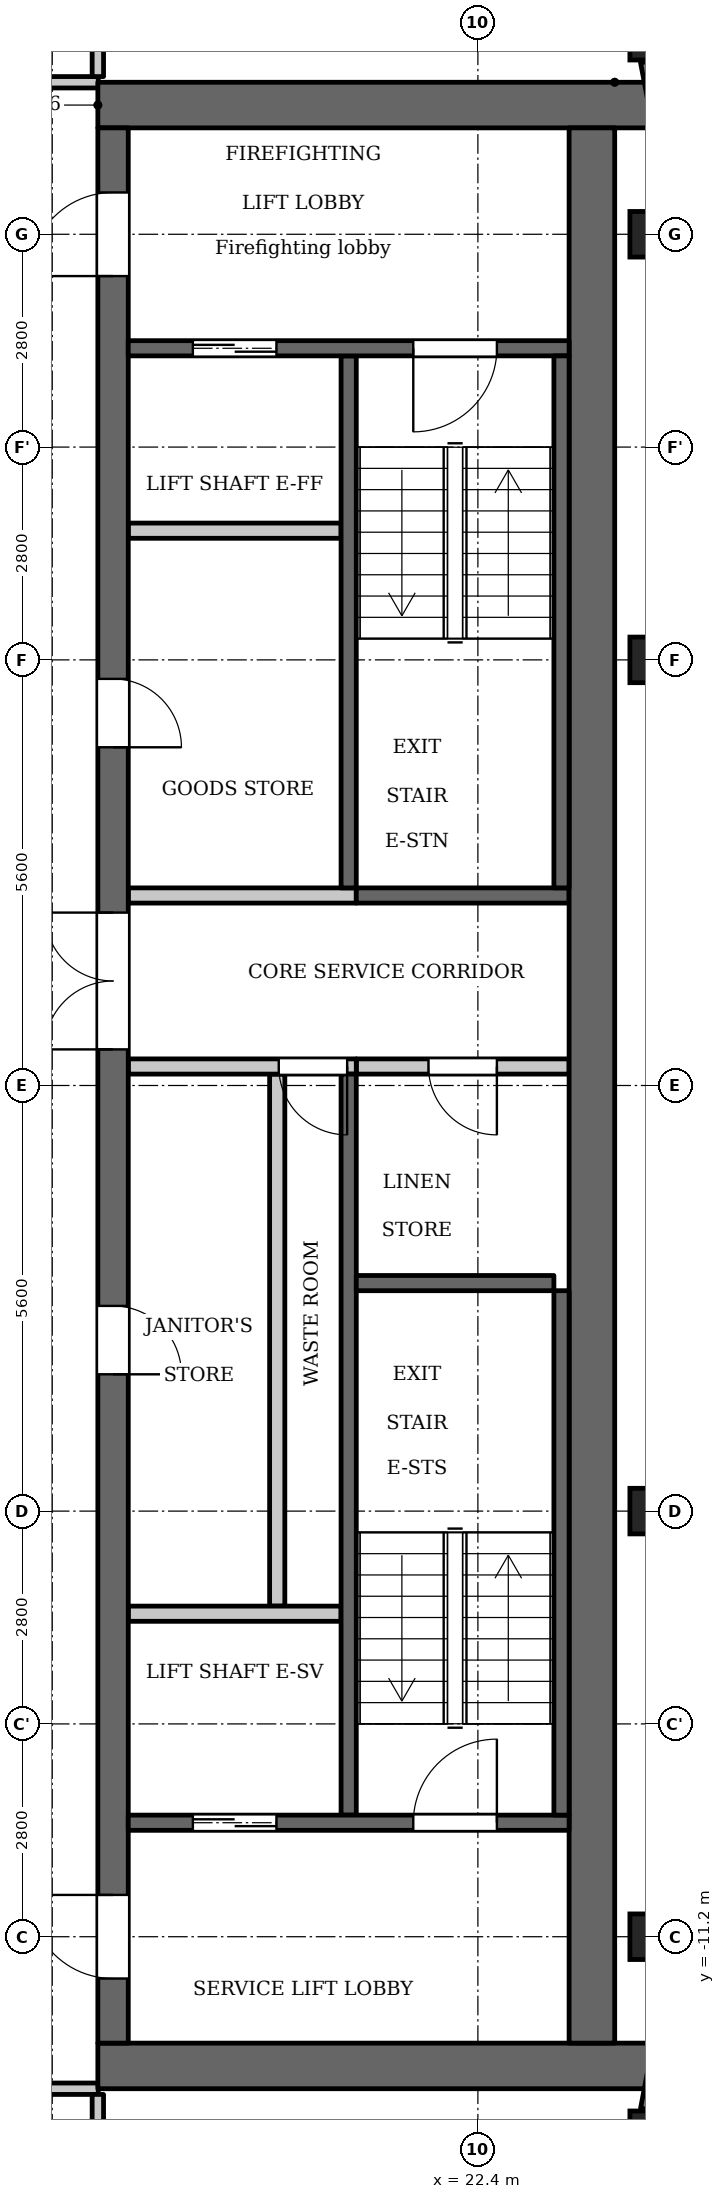
"""IFC4 building model, lengths in metres.
Left out: names, types, materials, properties, quantities, classifications, styles, units other than length and angle.
Written with IfcOpenShell. Run it as: python <this file> out.ifc"""

import sys

from ifc_helpers import new_model, si_unit, direction, frame, frame_2d, origin, origin_2d, place, context, subcontext, project, spatial, rectangle, extrude, element, fill, save


model = new_model("IFC4")
c1 = context("Model", 3, precision=1e-05, world=origin(), true_north=direction((0.0, 1.0)))
c2 = subcontext(c1, "Body", "Model", "MODEL_VIEW")
j1 = project(units=[si_unit("LENGTHUNIT", "METRE"), si_unit("PLANEANGLEUNIT", "RADIAN")], contexts=[c1])
p1 = place(None, origin())
s1 = spatial("IfcSite", under=j1, at=p1, CompositionType="ELEMENT")
p2 = place(p1, origin())
s2 = spatial("IfcBuilding", under=s1, at=p2, CompositionType="ELEMENT")
p3 = place(p2, frame((0.0, 0.0, 303.4)))
s3 = spatial("IfcBuildingStorey", under=s2, at=p3, CompositionType="ELEMENT", Elevation=303.4)
for number, where, z_axis, x_axis in (
    (1, (24.7, -13.793, 0.0), (0.0, 0.0, 1.0), (1.0, 0.0, 0.0)),
    (2, (24.7, -11.2, 0.0), (0.0, 0.0, 1.0), (1.0, 0.0, 0.0)),
    (3, (24.7, -5.6, 0.0), (0.0, 0.0, 1.0), (1.0, 0.0, 0.0)),
    (4, (24.7, 5.6, 0.0), (0.0, 0.0, 1.0), (1.0, 0.0, 0.0)),
    (5, (24.7, 11.2, 0.0), (0.0, 0.0, 1.0), (1.0, 0.0, 0.0)),
    (6, (24.7, 13.793, 0.0), (0.0, 0.0, 1.0), (1.0, 0.0, 0.0)),
):
    element("IfcColumn", number, at=place(p3, frame(where, z_axis=z_axis, x_axis=x_axis)), inside=s3, PredefinedType="COLUMN", context=c2, shape_type="SweptSolid", body=[
        extrude(rectangle(XDim=0.6, YDim=0.6, at=origin_2d()), origin(), (0.0, 0.0, 1.0), 3.5),
    ])
for number, where, z_axis, x_axis in (
    (7, (24.688, -13.485, 0.0), (0.0, 0.0, 1.0), (0.187, 0.982, 0.0)),
    (8, (25.052, 11.573, 0.0), (0.0, 0.0, 1.0), (-0.187, 0.982, 0.0)),
):
    element("IfcWall", number, at=place(p3, frame(where, z_axis=z_axis, x_axis=x_axis)), inside=s3, PredefinedType="SOLIDWALL", context=c2, shape_type="SweptSolid", body=[
        extrude(rectangle(XDim=1.947, YDim=0.3, at=frame_2d((0.973, 0.0))), origin(), (0.0, 0.0, 1.0), 2.6),
    ])
p4 = place(p3, frame((20.7, 2.6, 0.0), z_axis=(0.0, 0.0, 1.0), x_axis=(0.0, 1.0, 0.0)))
e9 = element("IfcWall", 9, at=p4, inside=s3, PredefinedType="SHEAR", context=c2, shape_type="SweptSolid", body=[
    extrude(rectangle(XDim=7.0, YDim=0.2, at=frame_2d((3.5, 0.0))), origin(), (0.0, 0.0, 1.0), 3.2),
])
p5 = place(p3, frame((20.7, -9.6, 0.0), z_axis=(0.0, 0.0, 1.0), x_axis=(0.0, 1.0, 0.0)))
e10 = element("IfcWall", 10, at=p5, inside=s3, PredefinedType="SHEAR", context=c2, shape_type="SweptSolid", body=[
    extrude(rectangle(XDim=9.75, YDim=0.2, at=frame_2d((4.875, 0.0))), origin(), (0.0, 0.0, 1.0), 3.2),
])
p6 = place(p3, frame((20.8, 2.5, 0.0), z_axis=(0.0, 0.0, 1.0), x_axis=(1.0, 0.0, 0.0)))
e11 = element("IfcWall", 11, at=p6, inside=s3, PredefinedType="SHEAR", context=c2, shape_type="SweptSolid", body=[
    extrude(rectangle(XDim=2.8, YDim=0.2, at=frame_2d((1.4, 0.0))), origin(), (0.0, 0.0, 1.0), 3.2),
])
p7 = place(p3, frame((20.8, 0.25, 0.0), z_axis=(0.0, 0.0, 1.0), x_axis=(1.0, 0.0, 0.0)))
e12 = element("IfcWall", 12, at=p7, inside=s3, PredefinedType="PARTITIONING", context=c2, shape_type="SweptSolid", body=[
    extrude(rectangle(XDim=2.8, YDim=0.2, at=frame_2d((1.4, 0.0))), origin(), (0.0, 0.0, 1.0), 3.2),
])
p8 = place(p7, frame((0.95, 0.0, 0.0)))
e13 = element("IfcOpeningElement", 13, at=p8, cuts=e12, PredefinedType="OPENING", context=c2, shape_type="SweptSolid", body=[
    extrude(rectangle(XDim=0.9, YDim=2.1, at=frame_2d((0.45, 1.05))), frame((0.0, 0.11, 0.0), z_axis=(0.0, -1.0, 0.0), x_axis=(1.0, 0.0, 0.0)), (0.0, 0.0, 1.0), 0.22),
])
for number, where, z_axis, x_axis in (
    (14, (17.4, 12.9, 0.0), (0.0, 0.0, 1.0), (1.0, 0.0, 0.0)),
    (15, (17.4, -12.9, 0.0), (0.0, 0.0, 1.0), (1.0, 0.0, 0.0)),
):
    element("IfcWall", number, at=place(p3, frame(where, z_axis=z_axis, x_axis=x_axis)), inside=s3, PredefinedType="SHEAR", context=c2, shape_type="SweptSolid", body=[
        extrude(rectangle(XDim=7.6, YDim=0.6, at=frame_2d((3.8, 0.0))), origin(), (0.0, 0.0, 1.0), 3.2),
    ])
p9 = place(p3, frame((19.76, -6.85, 0.0), z_axis=(0.0, 0.0, 1.0), x_axis=(0.0, 1.0, 0.0)))
e16 = element("IfcWall", 16, at=p9, inside=s3, PredefinedType="PARTITIONING", context=c2, shape_type="SweptSolid", body=[
    extrude(rectangle(XDim=7.0, YDim=0.2, at=frame_2d((3.5, 0.0))), origin(), (0.0, 0.0, 1.0), 3.2),
])
p10 = place(p3, frame((17.6, -12.6, 0.0), z_axis=(0.0, 0.0, 1.0), x_axis=(0.0, 1.0, 0.0)))
e17 = element("IfcWall", 17, at=p10, inside=s3, PredefinedType="SHEAR", context=c2, shape_type="SweptSolid", body=[
    extrude(rectangle(XDim=25.2, YDim=0.4, at=frame_2d((12.6, 0.0))), origin(), (0.0, 0.0, 1.0), 3.2),
])
p11 = place(p10, frame((8.8, 0.0, 0.0)))
e18 = element("IfcOpeningElement", 18, at=p11, cuts=e17, PredefinedType="OPENING", context=c2, shape_type="SweptSolid", body=[
    extrude(rectangle(XDim=0.9, YDim=2.1, at=frame_2d((0.45, 1.05))), frame((0.0, 0.21, 0.0), z_axis=(0.0, -1.0, 0.0), x_axis=(1.0, 0.0, 0.0)), (0.0, 0.0, 1.0), 0.42),
])
p12 = place(p10, frame((17.05, 0.0, 0.0)))
e19 = element("IfcOpeningElement", 19, at=p12, cuts=e17, PredefinedType="OPENING", context=c2, shape_type="SweptSolid", body=[
    extrude(rectangle(XDim=0.9, YDim=2.1, at=frame_2d((0.45, 1.05))), frame((0.0, 0.21, 0.0), z_axis=(0.0, -1.0, 0.0), x_axis=(1.0, 0.0, 0.0)), (0.0, 0.0, 1.0), 0.42),
])
p13 = place(p10, frame((23.25, 0.0, 0.0)))
e20 = element("IfcOpeningElement", 20, at=p13, cuts=e17, PredefinedType="OPENING", context=c2, shape_type="SweptSolid", body=[
    extrude(rectangle(XDim=1.1, YDim=2.1, at=frame_2d((0.55, 1.05))), frame((0.0, 0.21, 0.0), z_axis=(0.0, -1.0, 0.0), x_axis=(1.0, 0.0, 0.0)), (0.0, 0.0, 1.0), 0.42),
])
p14 = place(p10, frame((0.85, 0.0, 0.0)))
e21 = element("IfcOpeningElement", 21, at=p14, cuts=e17, PredefinedType="OPENING", context=c2, shape_type="SweptSolid", body=[
    extrude(rectangle(XDim=1.1, YDim=2.1, at=frame_2d((0.55, 1.05))), frame((0.0, 0.21, 0.0), z_axis=(0.0, -1.0, 0.0), x_axis=(1.0, 0.0, 0.0)), (0.0, 0.0, 1.0), 0.42),
])
p15 = place(p10, frame((13.075, 0.0, 0.0)))
e22 = element("IfcOpeningElement", 22, at=p15, cuts=e17, PredefinedType="OPENING", context=c2, shape_type="SweptSolid", body=[
    extrude(rectangle(XDim=1.8, YDim=2.1, at=frame_2d((0.9, 1.05))), frame((0.0, 0.21, 0.0), z_axis=(0.0, -1.0, 0.0), x_axis=(1.0, 0.0, 0.0)), (0.0, 0.0, 1.0), 0.42),
])
p16 = place(p3, frame((23.9, -12.6, 0.0), z_axis=(0.0, 0.0, 1.0), x_axis=(0.0, 1.0, 0.0)))
e23 = element("IfcWall", 23, at=p16, inside=s3, PredefinedType="SHEAR", context=c2, shape_type="SweptSolid", body=[
    extrude(rectangle(XDim=25.2, YDim=0.6, at=frame_2d((12.6, 0.0))), origin(), (0.0, 0.0, 1.0), 3.2),
])
p17 = place(p3, frame((17.8, -9.7, 0.0), z_axis=(0.0, 0.0, 1.0), x_axis=(1.0, 0.0, 0.0)))
e24 = element("IfcWall", 24, at=p17, inside=s3, PredefinedType="SHEAR", context=c2, shape_type="SweptSolid", body=[
    extrude(rectangle(XDim=5.8, YDim=0.2, at=frame_2d((2.9, 0.0))), origin(), (0.0, 0.0, 1.0), 3.2),
])
p18 = place(p17, frame((0.85, 0.0, 0.0)))
e25 = element("IfcOpeningElement", 25, at=p18, cuts=e24, PredefinedType="OPENING", context=c2, shape_type="SweptSolid", body=[
    extrude(rectangle(XDim=1.1, YDim=2.1, at=frame_2d((0.55, 1.05))), frame((0.0, 0.11, 0.0), z_axis=(0.0, -1.0, 0.0), x_axis=(1.0, 0.0, 0.0)), (0.0, 0.0, 1.0), 0.22),
])
p19 = place(p17, frame((3.75, 0.0, 0.0)))
e26 = element("IfcOpeningElement", 26, at=p19, cuts=e24, PredefinedType="OPENING", context=c2, shape_type="SweptSolid", body=[
    extrude(rectangle(XDim=1.1, YDim=2.1, at=frame_2d((0.55, 1.05))), frame((0.0, 0.11, 0.0), z_axis=(0.0, -1.0, 0.0), x_axis=(1.0, 0.0, 0.0)), (0.0, 0.0, 1.0), 0.22),
])
p20 = place(p3, frame((17.8, -6.95, 0.0), z_axis=(0.0, 0.0, 1.0), x_axis=(1.0, 0.0, 0.0)))
e27 = element("IfcWall", 27, at=p20, inside=s3, PredefinedType="PARTITIONING", context=c2, shape_type="SweptSolid", body=[
    extrude(rectangle(XDim=2.8, YDim=0.2, at=frame_2d((1.4, 0.0))), origin(), (0.0, 0.0, 1.0), 3.2),
])
p21 = place(p3, frame((17.8, 0.25, 0.0), z_axis=(0.0, 0.0, 1.0), x_axis=(1.0, 0.0, 0.0)))
e28 = element("IfcWall", 28, at=p21, inside=s3, PredefinedType="PARTITIONING", context=c2, shape_type="SweptSolid", body=[
    extrude(rectangle(XDim=3.0, YDim=0.2, at=frame_2d((1.5, 0.0))), origin(), (0.0, 0.0, 1.0), 3.2),
])
p22 = place(p21, frame((1.98, 0.0, 0.0)))
e29 = element("IfcOpeningElement", 29, at=p22, cuts=e28, PredefinedType="OPENING", context=c2, shape_type="SweptSolid", body=[
    extrude(rectangle(XDim=0.9, YDim=2.1, at=frame_2d((0.45, 1.05))), frame((0.0, 0.11, 0.0), z_axis=(0.0, -1.0, 0.0), x_axis=(1.0, 0.0, 0.0)), (0.0, 0.0, 1.0), 0.22),
])
p23 = place(p3, frame((17.8, 2.5, 0.0), z_axis=(0.0, 0.0, 1.0), x_axis=(1.0, 0.0, 0.0)))
e30 = element("IfcWall", 30, at=p23, inside=s3, PredefinedType="PARTITIONING", context=c2, shape_type="SweptSolid", body=[
    extrude(rectangle(XDim=3.0, YDim=0.2, at=frame_2d((1.5, 0.0))), origin(), (0.0, 0.0, 1.0), 3.2),
])
p24 = place(p3, frame((17.8, 7.3, 0.0), z_axis=(0.0, 0.0, 1.0), x_axis=(1.0, 0.0, 0.0)))
e31 = element("IfcWall", 31, at=p24, inside=s3, PredefinedType="PARTITIONING", context=c2, shape_type="SweptSolid", body=[
    extrude(rectangle(XDim=2.8, YDim=0.2, at=frame_2d((1.4, 0.0))), origin(), (0.0, 0.0, 1.0), 3.2),
])
p25 = place(p3, frame((17.8, 9.7, 0.0), z_axis=(0.0, 0.0, 1.0), x_axis=(1.0, 0.0, 0.0)))
e32 = element("IfcWall", 32, at=p25, inside=s3, PredefinedType="SHEAR", context=c2, shape_type="SweptSolid", body=[
    extrude(rectangle(XDim=5.8, YDim=0.2, at=frame_2d((2.9, 0.0))), origin(), (0.0, 0.0, 1.0), 3.2),
])
p26 = place(p25, frame((0.85, 0.0, 0.0)))
e33 = element("IfcOpeningElement", 33, at=p26, cuts=e32, PredefinedType="OPENING", context=c2, shape_type="SweptSolid", body=[
    extrude(rectangle(XDim=1.1, YDim=2.1, at=frame_2d((0.55, 1.05))), frame((0.0, 0.11, 0.0), z_axis=(0.0, -1.0, 0.0), x_axis=(1.0, 0.0, 0.0)), (0.0, 0.0, 1.0), 0.22),
])
p27 = place(p25, frame((3.75, 0.0, 0.0)))
e34 = element("IfcOpeningElement", 34, at=p27, cuts=e32, PredefinedType="OPENING", context=c2, shape_type="SweptSolid", body=[
    extrude(rectangle(XDim=1.1, YDim=2.1, at=frame_2d((0.55, 1.05))), frame((0.0, 0.11, 0.0), z_axis=(0.0, -1.0, 0.0), x_axis=(1.0, 0.0, 0.0)), (0.0, 0.0, 1.0), 0.22),
])
p28 = place(p3, frame((23.5, 2.6, 0.0), z_axis=(0.0, 0.0, 1.0), x_axis=(0.0, 1.0, 0.0)))
e35 = element("IfcWall", 35, at=p28, inside=s3, PredefinedType="SHEAR", context=c2, shape_type="SweptSolid", body=[
    extrude(rectangle(XDim=7.0, YDim=0.2, at=frame_2d((3.5, 0.0))), origin(), (0.0, 0.0, 1.0), 3.2),
])
p29 = place(p3, frame((23.5, -9.6, 0.0), z_axis=(0.0, 0.0, 1.0), x_axis=(0.0, 1.0, 0.0)))
e36 = element("IfcWall", 36, at=p29, inside=s3, PredefinedType="SHEAR", context=c2, shape_type="SweptSolid", body=[
    extrude(rectangle(XDim=6.9, YDim=0.2, at=frame_2d((3.45, 0.0))), origin(), (0.0, 0.0, 1.0), 3.2),
])
p30 = place(p3, frame((20.8, -2.6, 0.0), z_axis=(0.0, 0.0, 1.0), x_axis=(1.0, 0.0, 0.0)))
e37 = element("IfcWall", 37, at=p30, inside=s3, PredefinedType="SHEAR", context=c2, shape_type="SweptSolid", body=[
    extrude(rectangle(XDim=2.6, YDim=0.2, at=frame_2d((1.3, 0.0))), origin(), (0.0, 0.0, 1.0), 3.2),
])
p31 = place(p3, frame((15.32, -13.2, 0.0), z_axis=(0.0, 0.0, 1.0), x_axis=(1.0, 0.0, 0.0)))
e38 = element("IfcWall", 38, at=p31, inside=s3, PredefinedType="PARTITIONING", context=c2, shape_type="SweptSolid", body=[
    extrude(rectangle(XDim=2.085, YDim=0.15, at=frame_2d((1.042, 0.0))), origin(), (0.0, 0.0, 1.0), 3.2),
])
p32 = place(p31, frame((0.42, 0.0, 0.0)))
e39 = element("IfcOpeningElement", 39, at=p32, cuts=e38, PredefinedType="OPENING", context=c2, shape_type="SweptSolid", body=[
    extrude(rectangle(XDim=1.0, YDim=2.1, at=frame_2d((0.5, 1.05))), frame((0.0, 0.085, 0.0), z_axis=(0.0, -1.0, 0.0), x_axis=(1.0, 0.0, 0.0)), (0.0, 0.0, 1.0), 0.17),
])
p33 = place(p3, frame((15.32, 13.2, 0.0), z_axis=(0.0, 0.0, 1.0), x_axis=(1.0, 0.0, 0.0)))
e40 = element("IfcWall", 40, at=p33, inside=s3, PredefinedType="PARTITIONING", context=c2, shape_type="SweptSolid", body=[
    extrude(rectangle(XDim=2.085, YDim=0.15, at=frame_2d((1.042, 0.0))), origin(), (0.0, 0.0, 1.0), 3.2),
])
p34 = place(p33, frame((0.43, 0.0, 0.0)))
e41 = element("IfcOpeningElement", 41, at=p34, cuts=e40, PredefinedType="OPENING", context=c2, shape_type="SweptSolid", body=[
    extrude(rectangle(XDim=1.0, YDim=2.1, at=frame_2d((0.5, 1.05))), frame((0.0, 0.085, 0.0), z_axis=(0.0, -1.0, 0.0), x_axis=(1.0, 0.0, 0.0)), (0.0, 0.0, 1.0), 0.17),
])
p35 = place(p3, frame((17.4, -19.236, 0.0), z_axis=(0.0, 0.0, 1.0), x_axis=(0.0, 1.0, 0.0)))
e42 = element("IfcWall", 42, at=p35, inside=s3, PredefinedType="PARTITIONING", context=c2, shape_type="SweptSolid", body=[
    extrude(rectangle(XDim=5.961, YDim=0.15, at=frame_2d((2.981, 0.0))), origin(), (0.0, 0.0, 1.0), 3.2),
])
p36 = place(p35, frame((3.917, 0.0, 0.0)))
e43 = element("IfcOpeningElement", 43, at=p36, cuts=e42, PredefinedType="OPENING", context=c2, shape_type="SweptSolid", body=[
    extrude(rectangle(XDim=0.9, YDim=2.1, at=frame_2d((0.45, 1.05))), frame((0.0, 0.085, 0.0), z_axis=(0.0, -1.0, 0.0), x_axis=(1.0, 0.0, 0.0)), (0.0, 0.0, 1.0), 0.17),
])
p37 = place(p3, frame((17.4, 13.275, 0.0), z_axis=(0.0, 0.0, 1.0), x_axis=(0.0, 1.0, 0.0)))
e44 = element("IfcWall", 44, at=p37, inside=s3, PredefinedType="PARTITIONING", context=c2, shape_type="SweptSolid", body=[
    extrude(rectangle(XDim=5.961, YDim=0.15, at=frame_2d((2.981, 0.0))), origin(), (0.0, 0.0, 1.0), 3.2),
])
p38 = place(p37, frame((4.575, 0.0, 0.0)))
e45 = element("IfcOpeningElement", 45, at=p38, cuts=e44, PredefinedType="OPENING", context=c2, shape_type="SweptSolid", body=[
    extrude(rectangle(XDim=0.9, YDim=2.1, at=frame_2d((0.45, 1.05))), frame((0.0, 0.085, 0.0), z_axis=(0.0, -1.0, 0.0), x_axis=(1.0, 0.0, 0.0)), (0.0, 0.0, 1.0), 0.17),
])
p39 = place(p18, origin())
e46 = element("IfcDoor", 46, at=p39, inside=s3, OperationType="DOUBLE_DOOR_SLIDING", PredefinedType="DOOR", context=c2, shape_type="SweptSolid", body=[
    extrude(rectangle(XDim=1.1, YDim=2.1, at=frame_2d((0.55, 1.05))), frame((0.0, 0.025, 0.0), z_axis=(0.0, -1.0, 0.0), x_axis=(1.0, 0.0, 0.0)), (0.0, 0.0, 1.0), 0.05),
])
fill(e25, e46)
p40 = place(p11, origin())
e47 = element("IfcDoor", 47, at=p40, inside=s3, OperationType="SINGLE_SWING_LEFT", PredefinedType="DOOR", context=c2, shape_type="SweptSolid", body=[
    extrude(rectangle(XDim=0.9, YDim=2.1, at=frame_2d((0.45, 1.05))), frame((0.0, 0.025, 0.0), z_axis=(0.0, -1.0, 0.0), x_axis=(1.0, 0.0, 0.0)), (0.0, 0.0, 1.0), 0.05),
])
fill(e18, e47)
p41 = place(p22, origin())
e48 = element("IfcDoor", 48, at=p41, inside=s3, OperationType="SINGLE_SWING_RIGHT", PredefinedType="DOOR", context=c2, shape_type="SweptSolid", body=[
    extrude(rectangle(XDim=0.9, YDim=2.1, at=frame_2d((0.45, 1.05))), frame((0.0, 0.025, 0.0), z_axis=(0.0, -1.0, 0.0), x_axis=(1.0, 0.0, 0.0)), (0.0, 0.0, 1.0), 0.05),
])
fill(e29, e48)
p42 = place(p12, origin())
e49 = element("IfcDoor", 49, at=p42, inside=s3, OperationType="SINGLE_SWING_LEFT", PredefinedType="DOOR", context=c2, shape_type="SweptSolid", body=[
    extrude(rectangle(XDim=0.9, YDim=2.1, at=frame_2d((0.45, 1.05))), frame((0.0, 0.025, 0.0), z_axis=(0.0, -1.0, 0.0), x_axis=(1.0, 0.0, 0.0)), (0.0, 0.0, 1.0), 0.05),
])
fill(e19, e49)
p43 = place(p26, origin())
e50 = element("IfcDoor", 50, at=p43, inside=s3, OperationType="DOUBLE_DOOR_SLIDING", PredefinedType="DOOR", context=c2, shape_type="SweptSolid", body=[
    extrude(rectangle(XDim=1.1, YDim=2.1, at=frame_2d((0.55, 1.05))), frame((0.0, 0.025, 0.0), z_axis=(0.0, -1.0, 0.0), x_axis=(1.0, 0.0, 0.0)), (0.0, 0.0, 1.0), 0.05),
])
fill(e33, e50)
p44 = place(p13, origin())
e51 = element("IfcDoor", 51, at=p44, inside=s3, OperationType="SINGLE_SWING_RIGHT", PredefinedType="DOOR", context=c2, shape_type="SweptSolid", body=[
    extrude(rectangle(XDim=1.1, YDim=2.1, at=frame_2d((0.55, 1.05))), frame((0.0, 0.025, 0.0), z_axis=(0.0, -1.0, 0.0), x_axis=(1.0, 0.0, 0.0)), (0.0, 0.0, 1.0), 0.05),
])
fill(e20, e51)
p45 = place(p14, origin())
e52 = element("IfcDoor", 52, at=p45, inside=s3, OperationType="SINGLE_SWING_LEFT", PredefinedType="DOOR", context=c2, shape_type="SweptSolid", body=[
    extrude(rectangle(XDim=1.1, YDim=2.1, at=frame_2d((0.55, 1.05))), frame((0.0, 0.025, 0.0), z_axis=(0.0, -1.0, 0.0), x_axis=(1.0, 0.0, 0.0)), (0.0, 0.0, 1.0), 0.05),
])
fill(e21, e52)
p46 = place(p27, origin())
e53 = element("IfcDoor", 53, at=p46, inside=s3, OperationType="SINGLE_SWING_LEFT", PredefinedType="DOOR", context=c2, shape_type="SweptSolid", body=[
    extrude(rectangle(XDim=1.1, YDim=2.1, at=frame_2d((0.55, 1.05))), frame((0.0, 0.025, 0.0), z_axis=(0.0, -1.0, 0.0), x_axis=(1.0, 0.0, 0.0)), (0.0, 0.0, 1.0), 0.05),
])
fill(e34, e53)
p47 = place(p19, origin())
e54 = element("IfcDoor", 54, at=p47, inside=s3, OperationType="SINGLE_SWING_LEFT", PredefinedType="DOOR", context=c2, shape_type="SweptSolid", body=[
    extrude(rectangle(XDim=1.1, YDim=2.1, at=frame_2d((0.55, 1.05))), frame((0.0, 0.025, 0.0), z_axis=(0.0, -1.0, 0.0), x_axis=(1.0, 0.0, 0.0)), (0.0, 0.0, 1.0), 0.05),
])
fill(e26, e54)
p48 = place(p15, origin())
e55 = element("IfcDoor", 55, at=p48, inside=s3, OperationType="DOUBLE_DOOR_SINGLE_SWING", PredefinedType="DOOR", context=c2, shape_type="SweptSolid", body=[
    extrude(rectangle(XDim=1.8, YDim=2.1, at=frame_2d((0.9, 1.05))), frame((0.0, 0.025, 0.0), z_axis=(0.0, -1.0, 0.0), x_axis=(1.0, 0.0, 0.0)), (0.0, 0.0, 1.0), 0.05),
])
fill(e22, e55)
p49 = place(p8, origin())
e56 = element("IfcDoor", 56, at=p49, inside=s3, OperationType="SINGLE_SWING_RIGHT", PredefinedType="DOOR", context=c2, shape_type="SweptSolid", body=[
    extrude(rectangle(XDim=0.9, YDim=2.1, at=frame_2d((0.45, 1.05))), frame((0.0, 0.025, 0.0), z_axis=(0.0, -1.0, 0.0), x_axis=(1.0, 0.0, 0.0)), (0.0, 0.0, 1.0), 0.05),
])
fill(e13, e56)
save(model, sys.argv[1])
